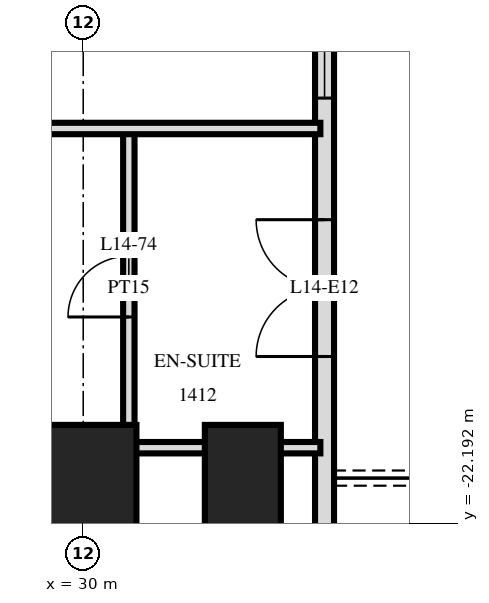
"""IFC4 building model, lengths in metres.
Left out: names, types, materials, properties, quantities, classifications, styles, units other than length and angle.
Written with IfcOpenShell. Run it as: python <this file> out.ifc"""

import sys

from ifc_helpers import new_model, si_unit, direction, frame, frame_2d, origin, origin_2d, place, context, subcontext, project, spatial, rectangle, extrude, element, fill, save


model = new_model("IFC4")
c1 = context("Model", 3, precision=1e-05, world=origin(), true_north=direction((0.0, 1.0)))
c2 = subcontext(c1, "Body", "Model", "MODEL_VIEW")
j1 = project(units=[si_unit("LENGTHUNIT", "METRE"), si_unit("PLANEANGLEUNIT", "RADIAN")], contexts=[c1])
p1 = place(None, origin())
s1 = spatial("IfcSite", under=j1, at=p1, CompositionType="ELEMENT")
p2 = place(p1, origin())
s2 = spatial("IfcBuilding", under=s1, at=p2, CompositionType="ELEMENT")
p3 = place(p2, frame((0.0, 0.0, 60.0)))
s3 = spatial("IfcBuildingStorey", under=s2, at=p3, CompositionType="ELEMENT", Elevation=60.0)
p4 = place(p3, frame((30.0, -21.6, 0.0), z_axis=(0.0, 0.0, 1.0), x_axis=(1.0, 0.0, 0.0)))
e1 = element("IfcColumn", 1, at=p4, inside=s3, PredefinedType="COLUMN", context=c2, shape_type="SweptSolid", body=[
    extrude(rectangle(XDim=1.4, YDim=1.4, at=origin_2d()), origin(), (0.0, 0.0, 1.0), 3.6),
])
p5 = place(p3, frame((32.1, -21.6, 0.0), z_axis=(0.0, 0.0, 1.0), x_axis=(0.0, 1.0, 0.0)))
e2 = element("IfcColumn", 2, at=p5, inside=s3, PredefinedType="COLUMN", context=c2, shape_type="SweptSolid", body=[
    extrude(rectangle(XDim=1.4, YDim=1.0, at=origin_2d()), origin(), (0.0, 0.0, 1.0), 3.6),
])
p6 = place(p3, frame((33.175, -24.875, 0.0), z_axis=(0.0, 0.0, 1.0), x_axis=(0.0, 1.0, 0.0)))
e3 = element("IfcWall", 3, at=p6, inside=s3, PredefinedType="SOLIDWALL", context=c2, shape_type="SweptSolid", body=[
    extrude(rectangle(XDim=21.551, YDim=0.25, at=frame_2d((10.775, 0.0))), origin(), (0.0, 0.0, 1.0), 3.32),
])
p7 = place(p6, frame((0.575, 0.0, 0.0)))
e4 = element("IfcOpeningElement", 4, at=p7, cuts=e3, PredefinedType="OPENING", context=c2, shape_type="SweptSolid", body=[
    extrude(rectangle(XDim=1.8, YDim=2.4, at=frame_2d((0.9, 1.2))), frame((0.0, 0.135, 0.0), z_axis=(0.0, -1.0, 0.0), x_axis=(1.0, 0.0, 0.0)), (0.0, 0.0, 1.0), 0.27),
])
p8 = place(p6, frame((4.875, 0.0, 0.0)))
e5 = element("IfcOpeningElement", 5, at=p8, cuts=e3, PredefinedType="OPENING", context=c2, shape_type="SweptSolid", body=[
    extrude(rectangle(XDim=1.8, YDim=2.4, at=frame_2d((0.9, 1.2))), frame((0.0, 0.135, 0.0), z_axis=(0.0, -1.0, 0.0), x_axis=(1.0, 0.0, 0.0)), (0.0, 0.0, 1.0), 0.27),
])
p9 = place(p6, frame((8.275, 0.0, 0.3)))
e6 = element("IfcOpeningElement", 6, at=p9, cuts=e3, PredefinedType="OPENING", context=c2, shape_type="SweptSolid", body=[
    extrude(rectangle(XDim=1.2, YDim=2.1, at=frame_2d((0.6, 1.05))), frame((0.0, 0.135, 0.0), z_axis=(0.0, -1.0, 0.0), x_axis=(1.0, 0.0, 0.0)), (0.0, 0.0, 1.0), 0.27),
])
p10 = place(p6, frame((10.175, 0.0, 0.3)))
e7 = element("IfcOpeningElement", 7, at=p10, cuts=e3, PredefinedType="OPENING", context=c2, shape_type="SweptSolid", body=[
    extrude(rectangle(XDim=2.4, YDim=2.1, at=frame_2d((1.2, 1.05))), frame((0.0, 0.135, 0.0), z_axis=(0.0, -1.0, 0.0), x_axis=(1.0, 0.0, 0.0)), (0.0, 0.0, 1.0), 0.27),
])
p11 = place(p6, frame((13.475, 0.0, 0.0)))
e8 = element("IfcOpeningElement", 8, at=p11, cuts=e3, PredefinedType="OPENING", context=c2, shape_type="SweptSolid", body=[
    extrude(rectangle(XDim=1.8, YDim=2.4, at=frame_2d((0.9, 1.2))), frame((0.0, 0.135, 0.0), z_axis=(0.0, -1.0, 0.0), x_axis=(1.0, 0.0, 0.0)), (0.0, 0.0, 1.0), 0.27),
])
p12 = place(p3, frame((30.6, -21.2, 0.0), z_axis=(0.0, 0.0, 1.0), x_axis=(0.0, 1.0, 0.0)))
e9 = element("IfcWall", 9, at=p12, inside=s3, PredefinedType="PARTITIONING", context=c2, shape_type="SweptSolid", body=[
    extrude(rectangle(XDim=4.2, YDim=0.15, at=frame_2d((2.1, 0.0))), origin(), (0.0, 0.0, 1.0), 3.32),
])
p13 = place(p12, frame((1.72, 0.0, 0.0)))
e10 = element("IfcOpeningElement", 10, at=p13, cuts=e9, PredefinedType="OPENING", context=c2, shape_type="SweptSolid", body=[
    extrude(rectangle(XDim=0.8, YDim=2.1, at=frame_2d((0.4, 1.05))), frame((0.0, 0.085, 0.0), z_axis=(0.0, -1.0, 0.0), x_axis=(1.0, 0.0, 0.0)), (0.0, 0.0, 1.0), 0.17),
])
p14 = place(p3, frame((30.6, -21.2, 0.0), z_axis=(0.0, 0.0, 1.0), x_axis=(1.0, 0.0, 0.0)))
e11 = element("IfcWall", 11, at=p14, inside=s3, PredefinedType="PARTITIONING", context=c2, shape_type="SweptSolid", body=[
    extrude(rectangle(XDim=2.52, YDim=0.15, at=frame_2d((1.26, 0.0))), origin(), (0.0, 0.0, 1.0), 3.32),
])
p15 = place(p3, frame((-33.12, -17.0, 0.0), z_axis=(0.0, 0.0, 1.0), x_axis=(1.0, 0.0, 0.0)))
e12 = element("IfcWall", 12, at=p15, inside=s3, PredefinedType="PARTITIONING", context=c2, shape_type="SweptSolid", body=[
    extrude(rectangle(XDim=66.24, YDim=0.15, at=frame_2d((33.12, 0.0))), origin(), (0.0, 0.0, 1.0), 3.32),
])
p16 = place(p15, frame((12.27, 0.0, 0.0)))
e13 = element("IfcOpeningElement", 13, at=p16, cuts=e12, PredefinedType="OPENING", context=c2, shape_type="SweptSolid", body=[
    extrude(rectangle(XDim=1.0, YDim=2.1, at=frame_2d((0.5, 1.05))), frame((0.0, 0.085, 0.0), z_axis=(0.0, -1.0, 0.0), x_axis=(1.0, 0.0, 0.0)), (0.0, 0.0, 1.0), 0.17),
])
p17 = place(p15, frame((16.97, 0.0, 0.0)))
e14 = element("IfcOpeningElement", 14, at=p17, cuts=e12, PredefinedType="OPENING", context=c2, shape_type="SweptSolid", body=[
    extrude(rectangle(XDim=1.0, YDim=2.1, at=frame_2d((0.5, 1.05))), frame((0.0, 0.085, 0.0), z_axis=(0.0, -1.0, 0.0), x_axis=(1.0, 0.0, 0.0)), (0.0, 0.0, 1.0), 0.17),
])
p18 = place(p15, frame((18.27, 0.0, 0.0)))
e15 = element("IfcOpeningElement", 15, at=p18, cuts=e12, PredefinedType="OPENING", context=c2, shape_type="SweptSolid", body=[
    extrude(rectangle(XDim=1.0, YDim=2.1, at=frame_2d((0.5, 1.05))), frame((0.0, 0.085, 0.0), z_axis=(0.0, -1.0, 0.0), x_axis=(1.0, 0.0, 0.0)), (0.0, 0.0, 1.0), 0.17),
])
p19 = place(p15, frame((22.97, 0.0, 0.0)))
e16 = element("IfcOpeningElement", 16, at=p19, cuts=e12, PredefinedType="OPENING", context=c2, shape_type="SweptSolid", body=[
    extrude(rectangle(XDim=1.0, YDim=2.1, at=frame_2d((0.5, 1.05))), frame((0.0, 0.085, 0.0), z_axis=(0.0, -1.0, 0.0), x_axis=(1.0, 0.0, 0.0)), (0.0, 0.0, 1.0), 0.17),
])
p20 = place(p15, frame((24.27, 0.0, 0.0)))
e17 = element("IfcOpeningElement", 17, at=p20, cuts=e12, PredefinedType="OPENING", context=c2, shape_type="SweptSolid", body=[
    extrude(rectangle(XDim=1.0, YDim=2.1, at=frame_2d((0.5, 1.05))), frame((0.0, 0.085, 0.0), z_axis=(0.0, -1.0, 0.0), x_axis=(1.0, 0.0, 0.0)), (0.0, 0.0, 1.0), 0.17),
])
p21 = place(p15, frame((28.97, 0.0, 0.0)))
e18 = element("IfcOpeningElement", 18, at=p21, cuts=e12, PredefinedType="OPENING", context=c2, shape_type="SweptSolid", body=[
    extrude(rectangle(XDim=1.0, YDim=2.1, at=frame_2d((0.5, 1.05))), frame((0.0, 0.085, 0.0), z_axis=(0.0, -1.0, 0.0), x_axis=(1.0, 0.0, 0.0)), (0.0, 0.0, 1.0), 0.17),
])
p22 = place(p15, frame((30.27, 0.0, 0.0)))
e19 = element("IfcOpeningElement", 19, at=p22, cuts=e12, PredefinedType="OPENING", context=c2, shape_type="SweptSolid", body=[
    extrude(rectangle(XDim=1.0, YDim=2.1, at=frame_2d((0.5, 1.05))), frame((0.0, 0.085, 0.0), z_axis=(0.0, -1.0, 0.0), x_axis=(1.0, 0.0, 0.0)), (0.0, 0.0, 1.0), 0.17),
])
p23 = place(p15, frame((33.82, 0.0, 0.0)))
e20 = element("IfcOpeningElement", 20, at=p23, cuts=e12, PredefinedType="OPENING", context=c2, shape_type="SweptSolid", body=[
    extrude(rectangle(XDim=1.0, YDim=2.1, at=frame_2d((0.5, 1.05))), frame((0.0, 0.085, 0.0), z_axis=(0.0, -1.0, 0.0), x_axis=(1.0, 0.0, 0.0)), (0.0, 0.0, 1.0), 0.17),
])
p24 = place(p15, frame((46.27, 0.0, 0.0)))
e21 = element("IfcOpeningElement", 21, at=p24, cuts=e12, PredefinedType="OPENING", context=c2, shape_type="SweptSolid", body=[
    extrude(rectangle(XDim=1.0, YDim=2.1, at=frame_2d((0.5, 1.05))), frame((0.0, 0.085, 0.0), z_axis=(0.0, -1.0, 0.0), x_axis=(1.0, 0.0, 0.0)), (0.0, 0.0, 1.0), 0.17),
])
p25 = place(p15, frame((52.97, 0.0, 0.0)))
e22 = element("IfcOpeningElement", 22, at=p25, cuts=e12, PredefinedType="OPENING", context=c2, shape_type="SweptSolid", body=[
    extrude(rectangle(XDim=1.0, YDim=2.1, at=frame_2d((0.5, 1.05))), frame((0.0, 0.085, 0.0), z_axis=(0.0, -1.0, 0.0), x_axis=(1.0, 0.0, 0.0)), (0.0, 0.0, 1.0), 0.17),
])
p26 = place(p15, frame((6.05, 0.0, 0.0)))
e23 = element("IfcOpeningElement", 23, at=p26, cuts=e12, PredefinedType="OPENING", context=c2, shape_type="SweptSolid", body=[
    extrude(rectangle(XDim=1.0, YDim=2.1, at=frame_2d((0.5, 1.05))), frame((0.0, 0.085, 0.0), z_axis=(0.0, -1.0, 0.0), x_axis=(1.0, 0.0, 0.0)), (0.0, 0.0, 1.0), 0.17),
])
p27 = place(p15, frame((59.15, 0.0, 0.0)))
e24 = element("IfcOpeningElement", 24, at=p27, cuts=e12, PredefinedType="OPENING", context=c2, shape_type="SweptSolid", body=[
    extrude(rectangle(XDim=1.0, YDim=2.1, at=frame_2d((0.5, 1.05))), frame((0.0, 0.085, 0.0), z_axis=(0.0, -1.0, 0.0), x_axis=(1.0, 0.0, 0.0)), (0.0, 0.0, 1.0), 0.17),
])
p28 = place(p8, origin())
e25 = element("IfcDoor", 25, at=p28, inside=s3, OperationType="DOUBLE_DOOR_SINGLE_SWING", PredefinedType="DOOR", context=c2, shape_type="SweptSolid", body=[
    extrude(rectangle(XDim=1.8, YDim=2.4, at=frame_2d((0.9, 1.2))), frame((0.0, 0.025, 0.0), z_axis=(0.0, -1.0, 0.0), x_axis=(1.0, 0.0, 0.0)), (0.0, 0.0, 1.0), 0.05),
])
fill(e5, e25)
p29 = place(p9, origin())
e26 = element("IfcWindow", 26, at=p29, inside=s3, PartitioningType="SINGLE_PANEL", PredefinedType="WINDOW", context=c2, shape_type="SweptSolid", body=[
    extrude(rectangle(XDim=1.2, YDim=2.1, at=frame_2d((0.6, 1.05))), frame((0.0, 0.03, 0.0), z_axis=(0.0, -1.0, 0.0), x_axis=(1.0, 0.0, 0.0)), (0.0, 0.0, 1.0), 0.06),
])
fill(e6, e26)
p30 = place(p13, origin())
e27 = element("IfcDoor", 27, at=p30, inside=s3, OperationType="SINGLE_SWING_RIGHT", PredefinedType="DOOR", context=c2, shape_type="SweptSolid", body=[
    extrude(rectangle(XDim=0.8, YDim=2.1, at=frame_2d((0.4, 1.05))), frame((0.0, 0.025, 0.0), z_axis=(0.0, -1.0, 0.0), x_axis=(1.0, 0.0, 0.0)), (0.0, 0.0, 1.0), 0.05),
])
fill(e10, e27)
save(model, sys.argv[1])
